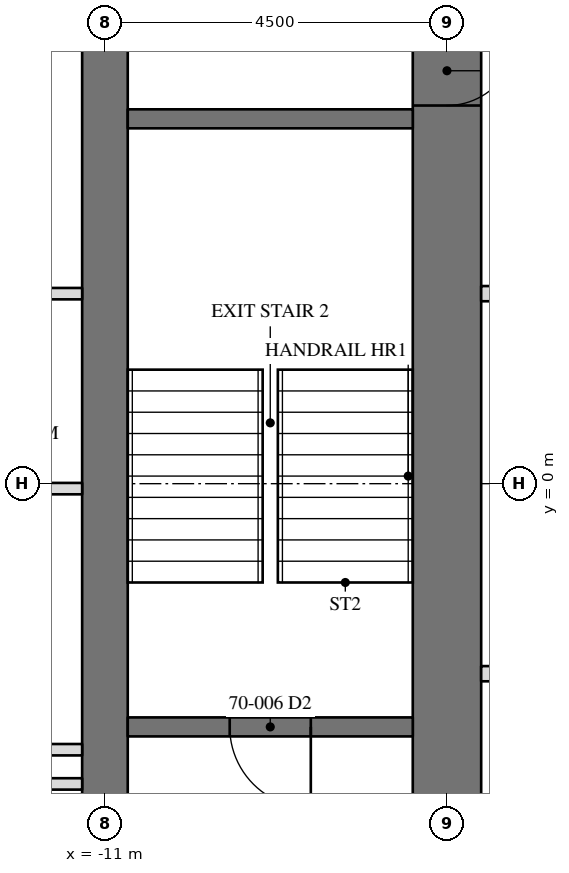
"""IFC4 building model, lengths in metres.
Left out: names, types, materials, properties, quantities, classifications, styles, units other than length and angle.
Written with IfcOpenShell. Run it as: python <this file> out.ifc"""

import sys

from ifc_helpers import new_model, si_unit, direction, frame, frame_2d, origin, place, context, subcontext, project, spatial, rectangle, extrude, element, fill, save


model = new_model("IFC4")
c1 = context("Model", 3, precision=1e-05, world=origin(), true_north=direction((0.0, 1.0)))
c2 = subcontext(c1, "Body", "Model", "MODEL_VIEW")
j1 = project(units=[si_unit("LENGTHUNIT", "METRE"), si_unit("PLANEANGLEUNIT", "RADIAN")], contexts=[c1])
p1 = place(None, origin())
s1 = spatial("IfcSite", under=j1, at=p1, CompositionType="ELEMENT")
p2 = place(p1, origin())
s2 = spatial("IfcBuilding", under=s1, at=p2, CompositionType="ELEMENT")
p3 = place(p2, frame((0.0, 0.0, 284.8)))
s3 = spatial("IfcBuildingStorey", under=s2, at=p3, CompositionType="ELEMENT", Elevation=284.8)
p4 = place(p3, frame((-11.0, 11.0, 0.0), z_axis=(0.0, 0.0, 1.0), x_axis=(0.0, -1.0, 0.0)))
e1 = element("IfcWall", 1, at=p4, inside=s3, PredefinedType="SHEAR", context=c2, shape_type="SweptSolid", body=[
    extrude(rectangle(XDim=22.0, YDim=0.6, at=frame_2d((11.0, 0.0))), origin(), (0.0, 0.0, 1.0), 3.6),
])
p5 = place(p4, frame((15.393, 0.0, 0.0)))
e2 = element("IfcOpeningElement", 2, at=p5, cuts=e1, PredefinedType="OPENING", context=c2, shape_type="SweptSolid", body=[
    extrude(rectangle(XDim=0.915, YDim=2.134, at=frame_2d((0.458, 1.067))), frame((0.0, 0.31, 0.0), z_axis=(0.0, -1.0, 0.0), x_axis=(1.0, 0.0, 0.0)), (0.0, 0.0, 1.0), 0.62),
])
p6 = place(p3, frame((-6.5, 6.5, 0.0), z_axis=(0.0, 0.0, 1.0), x_axis=(0.0, -1.0, 0.0)))
e3 = element("IfcWall", 3, at=p6, inside=s3, PredefinedType="SHEAR", context=c2, shape_type="SweptSolid", body=[
    extrude(rectangle(XDim=13.0, YDim=0.9, at=frame_2d((6.5, 0.0))), origin(), (0.0, 0.0, 1.0), 3.6),
])
p7 = place(p6, frame((10.893, 0.0, 0.0)))
e4 = element("IfcOpeningElement", 4, at=p7, cuts=e3, PredefinedType="OPENING", context=c2, shape_type="SweptSolid", body=[
    extrude(rectangle(XDim=0.915, YDim=2.134, at=frame_2d((0.458, 1.067))), frame((0.0, 0.46, 0.0), z_axis=(0.0, -1.0, 0.0), x_axis=(1.0, 0.0, 0.0)), (0.0, 0.0, 1.0), 0.92),
])
p8 = place(p6, frame((0.61, 0.0, 0.0)))
e5 = element("IfcOpeningElement", 5, at=p8, cuts=e3, PredefinedType="OPENING", context=c2, shape_type="SweptSolid", body=[
    extrude(rectangle(XDim=0.915, YDim=2.134, at=frame_2d((0.458, 1.067))), frame((0.0, 0.46, 0.0), z_axis=(0.0, -1.0, 0.0), x_axis=(1.0, 0.0, 0.0)), (0.0, 0.0, 1.0), 0.92),
])
p9 = place(p3, frame((-6.95, 4.8, 0.0), z_axis=(0.0, 0.0, 1.0), x_axis=(-1.0, 0.0, 0.0)))
e6 = element("IfcWall", 6, at=p9, inside=s3, PredefinedType="SOLIDWALL", context=c2, shape_type="SweptSolid", body=[
    extrude(rectangle(XDim=3.75, YDim=0.25, at=frame_2d((1.875, 0.0))), origin(), (0.0, 0.0, 1.0), 3.41),
])
p10 = place(p3, frame((-6.95, -3.2, 0.0), z_axis=(0.0, 0.0, 1.0), x_axis=(-1.0, 0.0, 0.0)))
e7 = element("IfcWall", 7, at=p10, inside=s3, PredefinedType="SOLIDWALL", context=c2, shape_type="SweptSolid", body=[
    extrude(rectangle(XDim=3.75, YDim=0.25, at=frame_2d((1.875, 0.0))), origin(), (0.0, 0.0, 1.0), 3.41),
])
p11 = place(p10, frame((1.342, 0.0, 0.0)))
e8 = element("IfcOpeningElement", 8, at=p11, cuts=e7, PredefinedType="OPENING", context=c2, shape_type="SweptSolid", body=[
    extrude(rectangle(XDim=1.067, YDim=2.134, at=frame_2d((0.533, 1.067))), frame((0.0, 0.135, 0.0), z_axis=(0.0, -1.0, 0.0), x_axis=(1.0, 0.0, 0.0)), (0.0, 0.0, 1.0), 0.27),
])
p12 = place(p3, frame((-6.05, 2.5, 0.0), z_axis=(0.0, 0.0, 1.0), x_axis=(1.0, 0.0, 0.0)))
e9 = element("IfcWall", 9, at=p12, inside=s3, PredefinedType="PARTITIONING", context=c2, shape_type="SweptSolid", body=[
    extrude(rectangle(XDim=12.1, YDim=0.2, at=frame_2d((6.05, 0.0))), origin(), (0.0, 0.0, 1.0), 3.41),
])
p13 = place(p12, frame((1.408, 0.0, 0.0)))
e10 = element("IfcOpeningElement", 10, at=p13, cuts=e9, PredefinedType="OPENING", context=c2, shape_type="SweptSolid", body=[
    extrude(rectangle(XDim=1.067, YDim=2.134, at=frame_2d((0.533, 1.067))), frame((0.0, 0.11, 0.0), z_axis=(0.0, -1.0, 0.0), x_axis=(1.0, 0.0, 0.0)), (0.0, 0.0, 1.0), 0.22),
])
p14 = place(p12, frame((5.517, 0.0, 0.0)))
e11 = element("IfcOpeningElement", 11, at=p14, cuts=e9, PredefinedType="OPENING", context=c2, shape_type="SweptSolid", body=[
    extrude(rectangle(XDim=1.067, YDim=2.134, at=frame_2d((0.533, 1.067))), frame((0.0, 0.11, 0.0), z_axis=(0.0, -1.0, 0.0), x_axis=(1.0, 0.0, 0.0)), (0.0, 0.0, 1.0), 0.22),
])
p15 = place(p12, frame((9.625, 0.0, 0.0)))
e12 = element("IfcOpeningElement", 12, at=p15, cuts=e9, PredefinedType="OPENING", context=c2, shape_type="SweptSolid", body=[
    extrude(rectangle(XDim=1.067, YDim=2.134, at=frame_2d((0.533, 1.067))), frame((0.0, 0.11, 0.0), z_axis=(0.0, -1.0, 0.0), x_axis=(1.0, 0.0, 0.0)), (0.0, 0.0, 1.0), 0.22),
])
p16 = place(p3, frame((6.05, -2.5, 0.0), z_axis=(0.0, 0.0, 1.0), x_axis=(-1.0, 0.0, 0.0)))
e13 = element("IfcWall", 13, at=p16, inside=s3, PredefinedType="PARTITIONING", context=c2, shape_type="SweptSolid", body=[
    extrude(rectangle(XDim=12.1, YDim=0.2, at=frame_2d((6.05, 0.0))), origin(), (0.0, 0.0, 1.0), 3.41),
])
p17 = place(p16, frame((9.625, 0.0, 0.0)))
e14 = element("IfcOpeningElement", 14, at=p17, cuts=e13, PredefinedType="OPENING", context=c2, shape_type="SweptSolid", body=[
    extrude(rectangle(XDim=1.067, YDim=2.134, at=frame_2d((0.533, 1.067))), frame((0.0, 0.11, 0.0), z_axis=(0.0, -1.0, 0.0), x_axis=(1.0, 0.0, 0.0)), (0.0, 0.0, 1.0), 0.22),
])
p18 = place(p16, frame((5.517, 0.0, 0.0)))
e15 = element("IfcOpeningElement", 15, at=p18, cuts=e13, PredefinedType="OPENING", context=c2, shape_type="SweptSolid", body=[
    extrude(rectangle(XDim=1.067, YDim=2.134, at=frame_2d((0.533, 1.067))), frame((0.0, 0.11, 0.0), z_axis=(0.0, -1.0, 0.0), x_axis=(1.0, 0.0, 0.0)), (0.0, 0.0, 1.0), 0.22),
])
p19 = place(p16, frame((1.408, 0.0, 0.0)))
e16 = element("IfcOpeningElement", 16, at=p19, cuts=e13, PredefinedType="OPENING", context=c2, shape_type="SweptSolid", body=[
    extrude(rectangle(XDim=1.067, YDim=2.134, at=frame_2d((0.533, 1.067))), frame((0.0, 0.11, 0.0), z_axis=(0.0, -1.0, 0.0), x_axis=(1.0, 0.0, 0.0)), (0.0, 0.0, 1.0), 0.22),
])
p20 = place(p3, frame((-11.3, -0.065, 0.0), z_axis=(0.0, 0.0, 1.0), x_axis=(-1.0, 0.0, 0.0)))
e17 = element("IfcWall", 17, at=p20, inside=s3, PredefinedType="PARTITIONING", context=c2, shape_type="SweptSolid", body=[
    extrude(rectangle(XDim=5.615, YDim=0.15, at=frame_2d((2.808, 0.0))), origin(), (0.0, 0.0, 1.0), 2.709),
])
p21 = place(p20, frame((3.042, 0.0, 0.0)))
e18 = element("IfcOpeningElement", 18, at=p21, cuts=e17, PredefinedType="OPENING", context=c2, shape_type="SweptSolid", body=[
    extrude(rectangle(XDim=0.915, YDim=2.134, at=frame_2d((0.458, 1.067))), frame((0.0, 0.085, 0.0), z_axis=(0.0, -1.0, 0.0), x_axis=(1.0, 0.0, 0.0)), (0.0, 0.0, 1.0), 0.17),
])
p22 = place(p20, frame((4.058, 0.0, 0.0)))
e19 = element("IfcOpeningElement", 19, at=p22, cuts=e17, PredefinedType="OPENING", context=c2, shape_type="SweptSolid", body=[
    extrude(rectangle(XDim=0.915, YDim=2.134, at=frame_2d((0.458, 1.067))), frame((0.0, 0.085, 0.0), z_axis=(0.0, -1.0, 0.0), x_axis=(1.0, 0.0, 0.0)), (0.0, 0.0, 1.0), 0.17),
])
p23 = place(p3, frame((-11.3, -3.95, 0.0), z_axis=(0.0, 0.0, 1.0), x_axis=(-1.0, 0.0, 0.0)))
e20 = element("IfcWall", 20, at=p23, inside=s3, PredefinedType="PARTITIONING", context=c2, shape_type="SweptSolid", body=[
    extrude(rectangle(XDim=1.525, YDim=0.15, at=frame_2d((0.762, 0.0))), origin(), (0.0, 0.0, 1.0), 3.41),
])
p24 = place(p3, frame((-11.3, -3.5, 0.0), z_axis=(0.0, 0.0, 1.0), x_axis=(-1.0, 0.0, 0.0)))
e21 = element("IfcWall", 21, at=p24, inside=s3, PredefinedType="PARTITIONING", context=c2, shape_type="SweptSolid", body=[
    extrude(rectangle(XDim=2.725, YDim=0.15, at=frame_2d((1.362, 0.0))), origin(), (0.0, 0.0, 1.0), 3.41),
])
p25 = place(p3, frame((-11.3, 2.5, 0.0), z_axis=(0.0, 0.0, 1.0), x_axis=(-1.0, 0.0, 0.0)))
e22 = element("IfcWall", 22, at=p25, inside=s3, PredefinedType="PARTITIONING", context=c2, shape_type="SweptSolid", body=[
    extrude(rectangle(XDim=2.375, YDim=0.15, at=frame_2d((1.188, 0.0))), origin(), (0.0, 0.0, 1.0), 3.41),
])
p26 = place(p11, origin())
e23 = element("IfcDoor", 23, at=p26, inside=s3, OperationType="SINGLE_SWING_LEFT", PredefinedType="DOOR", context=c2, shape_type="SweptSolid", body=[
    extrude(rectangle(XDim=1.067, YDim=2.134, at=frame_2d((0.533, 1.067))), frame((0.0, 0.025, 0.0), z_axis=(0.0, -1.0, 0.0), x_axis=(1.0, 0.0, 0.0)), (0.0, 0.0, 1.0), 0.05),
])
fill(e8, e23)
p27 = place(p8, origin())
e24 = element("IfcDoor", 24, at=p27, inside=s3, OperationType="SINGLE_SWING_RIGHT", PredefinedType="DOOR", context=c2, shape_type="SweptSolid", body=[
    extrude(rectangle(XDim=0.915, YDim=2.134, at=frame_2d((0.458, 1.067))), frame((0.0, -0.375, 0.0), z_axis=(0.0, -1.0, 0.0), x_axis=(1.0, 0.0, 0.0)), (0.0, 0.0, 1.0), 0.05),
])
fill(e5, e24)
save(model, sys.argv[1])
